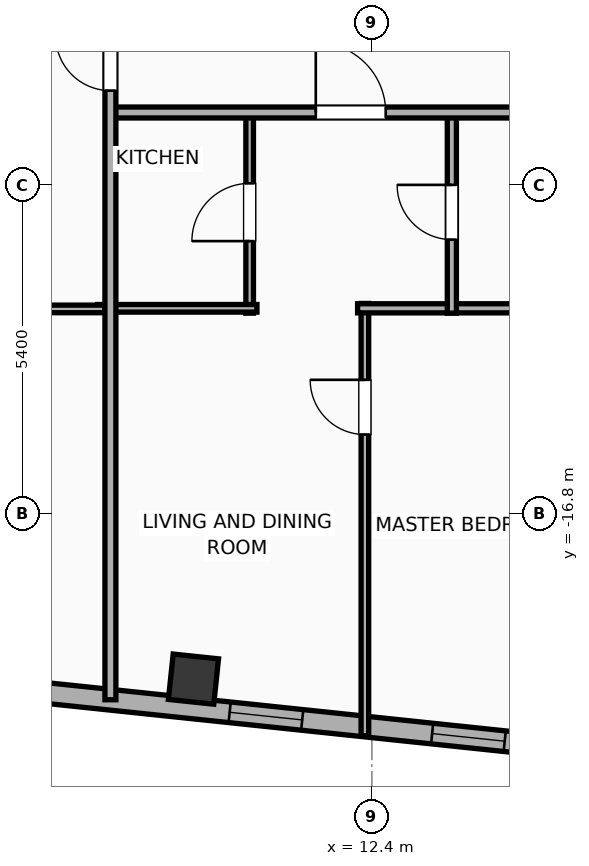
"""IFC4 building model, lengths in metres.
Left out: names, types, materials, properties, quantities, classifications, styles, units other than length and angle.
Written with IfcOpenShell. Run it as: python <this file> out.ifc"""

import sys

from ifc_helpers import new_model, si_unit, direction, frame, frame_2d, origin, origin_2d, place, context, subcontext, project, spatial, rectangle, hollow_rectangle, extrude, element, fill, save


model = new_model("IFC4")
c1 = context("Model", 3, precision=1e-05, world=origin(), true_north=direction((0.0, 1.0)))
c2 = subcontext(c1, "Body", "Model", "MODEL_VIEW")
j1 = project(units=[si_unit("LENGTHUNIT", "METRE"), si_unit("PLANEANGLEUNIT", "RADIAN")], contexts=[c1])
p1 = place(None, origin())
s1 = spatial("IfcSite", under=j1, at=p1, CompositionType="ELEMENT")
p2 = place(p1, origin())
s2 = spatial("IfcBuilding", under=s1, at=p2, CompositionType="ELEMENT")
p3 = place(p2, frame((0.0, 0.0, 295.1)))
s3 = spatial("IfcBuildingStorey", under=s2, at=p3, CompositionType="ELEMENT", Elevation=295.1)
p4 = place(p3, frame((9.466, -19.518, 0.0), z_axis=(0.0, 0.0, 1.0), x_axis=(0.994521895368, -0.104528463268, 0.0)))
e1 = element("IfcColumn", 1, at=p4, inside=s3, PredefinedType="COLUMN", context=c2, shape_type="SweptSolid", body=[
    extrude(hollow_rectangle(XDim=0.75, YDim=0.75, WallThickness=0.025, at=origin_2d()), origin(), (0.0, 0.0, 1.0), 3.9),
])
p5 = place(p3, frame((18.708, -20.972, 0.0), z_axis=(0.0, 0.0, 1.0), x_axis=(-0.994521888554, 0.104528528102, 0.0)))
e2 = element("IfcWall", 2, at=p5, inside=s3, PredefinedType="ELEMENTEDWALL", context=c2, shape_type="SweptSolid", body=[
    extrude(rectangle(XDim=46.766, YDim=0.34, at=frame_2d((23.383, 0.0))), origin(), (0.0, 0.0, 1.0), 3.635),
])
p6 = place(p5, frame((23.733, 0.0, 0.65)))
e3 = element("IfcOpeningElement", 3, at=p6, cuts=e2, PredefinedType="OPENING", context=c2, shape_type="SweptSolid", body=[
    extrude(rectangle(XDim=2.6, YDim=2.45, at=frame_2d((1.3, 1.225))), frame((0.0, 0.18, 0.0), z_axis=(0.0, -1.0, 0.0), x_axis=(1.0, 0.0, 0.0)), (0.0, 0.0, 1.0), 0.36),
])
p7 = place(p5, frame((44.402, 0.0, 0.75)))
e4 = element("IfcOpeningElement", 4, at=p7, cuts=e2, PredefinedType="OPENING", context=c2, shape_type="SweptSolid", body=[
    extrude(rectangle(XDim=1.2, YDim=2.05, at=frame_2d((0.6, 1.025))), frame((0.0, 0.18, 0.0), z_axis=(0.0, -1.0, 0.0), x_axis=(1.0, 0.0, 0.0)), (0.0, 0.0, 1.0), 0.36),
])
p8 = place(p5, frame((39.553, 0.0, 0.75)))
e5 = element("IfcOpeningElement", 5, at=p8, cuts=e2, PredefinedType="OPENING", context=c2, shape_type="SweptSolid", body=[
    extrude(rectangle(XDim=1.2, YDim=2.05, at=frame_2d((0.6, 1.025))), frame((0.0, 0.18, 0.0), z_axis=(0.0, -1.0, 0.0), x_axis=(1.0, 0.0, 0.0)), (0.0, 0.0, 1.0), 0.36),
])
p9 = place(p5, frame((42.419, 0.0, 0.75)))
e6 = element("IfcOpeningElement", 6, at=p9, cuts=e2, PredefinedType="OPENING", context=c2, shape_type="SweptSolid", body=[
    extrude(rectangle(XDim=1.2, YDim=2.05, at=frame_2d((0.6, 1.025))), frame((0.0, 0.18, 0.0), z_axis=(0.0, -1.0, 0.0), x_axis=(1.0, 0.0, 0.0)), (0.0, 0.0, 1.0), 0.36),
])
p10 = place(p5, frame((34.933, 0.0, 0.75)))
e7 = element("IfcOpeningElement", 7, at=p10, cuts=e2, PredefinedType="OPENING", context=c2, shape_type="SweptSolid", body=[
    extrude(rectangle(XDim=1.2, YDim=2.05, at=frame_2d((0.6, 1.025))), frame((0.0, 0.18, 0.0), z_axis=(0.0, -1.0, 0.0), x_axis=(1.0, 0.0, 0.0)), (0.0, 0.0, 1.0), 0.36),
])
p11 = place(p5, frame((28.692, 0.0, 0.75)))
e8 = element("IfcOpeningElement", 8, at=p11, cuts=e2, PredefinedType="OPENING", context=c2, shape_type="SweptSolid", body=[
    extrude(rectangle(XDim=1.2, YDim=2.05, at=frame_2d((0.6, 1.025))), frame((0.0, 0.18, 0.0), z_axis=(0.0, -1.0, 0.0), x_axis=(1.0, 0.0, 0.0)), (0.0, 0.0, 1.0), 0.36),
])
p12 = place(p5, frame((30.957, 0.0, 0.75)))
e9 = element("IfcOpeningElement", 9, at=p12, cuts=e2, PredefinedType="OPENING", context=c2, shape_type="SweptSolid", body=[
    extrude(rectangle(XDim=1.2, YDim=2.05, at=frame_2d((0.6, 1.025))), frame((0.0, 0.18, 0.0), z_axis=(0.0, -1.0, 0.0), x_axis=(1.0, 0.0, 0.0)), (0.0, 0.0, 1.0), 0.36),
])
p13 = place(p5, frame((7.495, 0.0, 0.75)))
e10 = element("IfcOpeningElement", 10, at=p13, cuts=e2, PredefinedType="OPENING", context=c2, shape_type="SweptSolid", body=[
    extrude(rectangle(XDim=1.2, YDim=2.05, at=frame_2d((0.6, 1.025))), frame((0.0, 0.18, 0.0), z_axis=(0.0, -1.0, 0.0), x_axis=(1.0, 0.0, 0.0)), (0.0, 0.0, 1.0), 0.36),
])
p14 = place(p5, frame((4.146, 0.0, 0.75)))
e11 = element("IfcOpeningElement", 11, at=p14, cuts=e2, PredefinedType="OPENING", context=c2, shape_type="SweptSolid", body=[
    extrude(rectangle(XDim=1.2, YDim=2.05, at=frame_2d((0.6, 1.025))), frame((0.0, 0.18, 0.0), z_axis=(0.0, -1.0, 0.0), x_axis=(1.0, 0.0, 0.0)), (0.0, 0.0, 1.0), 0.36),
])
p15 = place(p5, frame((1.362, 0.0, 0.75)))
e12 = element("IfcOpeningElement", 12, at=p15, cuts=e2, PredefinedType="OPENING", context=c2, shape_type="SweptSolid", body=[
    extrude(rectangle(XDim=1.2, YDim=2.05, at=frame_2d((0.6, 1.025))), frame((0.0, 0.18, 0.0), z_axis=(0.0, -1.0, 0.0), x_axis=(1.0, 0.0, 0.0)), (0.0, 0.0, 1.0), 0.36),
])
p16 = place(p5, frame((20.254, 0.0, 0.75)))
e13 = element("IfcOpeningElement", 13, at=p16, cuts=e2, PredefinedType="OPENING", context=c2, shape_type="SweptSolid", body=[
    extrude(rectangle(XDim=1.2, YDim=2.05, at=frame_2d((0.6, 1.025))), frame((0.0, 0.18, 0.0), z_axis=(0.0, -1.0, 0.0), x_axis=(1.0, 0.0, 0.0)), (0.0, 0.0, 1.0), 0.36),
])
p17 = place(p5, frame((16.172, 0.0, 0.75)))
e14 = element("IfcOpeningElement", 14, at=p17, cuts=e2, PredefinedType="OPENING", context=c2, shape_type="SweptSolid", body=[
    extrude(rectangle(XDim=1.2, YDim=2.05, at=frame_2d((0.6, 1.025))), frame((0.0, 0.18, 0.0), z_axis=(0.0, -1.0, 0.0), x_axis=(1.0, 0.0, 0.0)), (0.0, 0.0, 1.0), 0.36),
])
p18 = place(p5, frame((12.11, 0.0, 0.75)))
e15 = element("IfcOpeningElement", 15, at=p18, cuts=e2, PredefinedType="OPENING", context=c2, shape_type="SweptSolid", body=[
    extrude(rectangle(XDim=1.2, YDim=2.05, at=frame_2d((0.6, 1.025))), frame((0.0, 0.18, 0.0), z_axis=(0.0, -1.0, 0.0), x_axis=(1.0, 0.0, 0.0)), (0.0, 0.0, 1.0), 0.36),
])
p19 = place(p3, frame((12.285, -20.448, 0.0), z_axis=(0.0, 0.0, 1.0), x_axis=(0.0, 1.0, 0.0)))
e16 = element("IfcWall", 16, at=p19, inside=s3, PredefinedType="PARTITIONING", context=c2, shape_type="SweptSolid", body=[
    extrude(rectangle(XDim=7.108, YDim=0.125, at=frame_2d((3.554, 0.0))), origin(), (0.0, 0.0, 1.0), 3.635),
])
p20 = place(p19, frame((4.952, 0.0, 0.0)))
e17 = element("IfcOpeningElement", 17, at=p20, cuts=e16, PredefinedType="OPENING", context=c2, shape_type="SweptSolid", body=[
    extrude(rectangle(XDim=0.9, YDim=2.05, at=frame_2d((0.45, 1.025))), frame((0.0, 0.073, 0.0), z_axis=(0.0, -1.0, 0.0), x_axis=(1.0, 0.0, 0.0)), (0.0, 0.0, 1.0), 0.145),
])
p21 = place(p3, frame((12.165, -13.42, 0.0), z_axis=(0.0, 0.0, 1.0), x_axis=(1.0, 0.0, 0.0)))
e18 = element("IfcWall", 18, at=p21, inside=s3, PredefinedType="PLUMBINGWALL", context=c2, shape_type="SweptSolid", body=[
    extrude(rectangle(XDim=3.605, YDim=0.15, at=frame_2d((1.802, 0.0))), origin(), (0.0, 0.0, 1.0), 3.635),
])
p22 = place(p3, frame((10.39, -13.5, 0.0), z_axis=(0.0, 0.0, 1.0), x_axis=(0.0, 1.0, 0.0)))
e19 = element("IfcWall", 19, at=p22, inside=s3, PredefinedType="PARTITIONING", context=c2, shape_type="SweptSolid", body=[
    extrude(rectangle(XDim=3.32, YDim=0.125, at=frame_2d((1.66, 0.0))), origin(), (0.0, 0.0, 1.0), 3.635),
])
p23 = place(p22, frame((1.185, 0.0, 0.0)))
e20 = element("IfcOpeningElement", 20, at=p23, cuts=e19, PredefinedType="OPENING", context=c2, shape_type="SweptSolid", body=[
    extrude(rectangle(XDim=0.95, YDim=2.05, at=frame_2d((0.475, 1.025))), frame((0.0, 0.073, 0.0), z_axis=(0.0, -1.0, 0.0), x_axis=(1.0, 0.0, 0.0)), (0.0, 0.0, 1.0), 0.145),
])
p24 = place(p3, frame((7.887, -13.42, 0.0), z_axis=(0.0, 0.0, 1.0), x_axis=(1.0, 0.0, 0.0)))
e21 = element("IfcWall", 21, at=p24, inside=s3, PredefinedType="PARTITIONING", context=c2, shape_type="SweptSolid", body=[
    extrude(rectangle(XDim=2.623, YDim=0.125, at=frame_2d((1.311, 0.0))), origin(), (0.0, 0.0, 1.0), 3.635),
])
p25 = place(p3, frame((13.715, -13.5, 0.0), z_axis=(0.0, 0.0, 1.0), x_axis=(0.0, 1.0, 0.0)))
e22 = element("IfcWall", 22, at=p25, inside=s3, PredefinedType="PLUMBINGWALL", context=c2, shape_type="SweptSolid", body=[
    extrude(rectangle(XDim=3.32, YDim=0.15, at=frame_2d((1.66, 0.0))), origin(), (0.0, 0.0, 1.0), 3.635),
])
p26 = place(p25, frame((1.21, 0.0, 0.0)))
e23 = element("IfcOpeningElement", 23, at=p26, cuts=e22, PredefinedType="OPENING", context=c2, shape_type="SweptSolid", body=[
    extrude(rectangle(XDim=0.9, YDim=2.05, at=frame_2d((0.45, 1.025))), frame((0.0, 0.085, 0.0), z_axis=(0.0, -1.0, 0.0), x_axis=(1.0, 0.0, 0.0)), (0.0, 0.0, 1.0), 0.17),
])
p27 = place(p3, frame((8.08, -10.2, 0.0), z_axis=(0.0, 0.0, 1.0), x_axis=(1.0, 0.0, 0.0)))
e24 = element("IfcWall", 24, at=p27, inside=s3, PredefinedType="PARTITIONING", context=c2, shape_type="SweptSolid", body=[
    extrude(rectangle(XDim=15.226, YDim=0.18, at=frame_2d((7.613, 0.0))), origin(), (0.0, 0.0, 1.0), 3.635),
])
p28 = place(p27, frame((3.397, 0.0, 0.0)))
e25 = element("IfcOpeningElement", 25, at=p28, cuts=e24, PredefinedType="OPENING", context=c2, shape_type="SweptSolid", body=[
    extrude(rectangle(XDim=1.15, YDim=2.05, at=frame_2d((0.575, 1.025))), frame((0.0, 0.1, 0.0), z_axis=(0.0, -1.0, 0.0), x_axis=(1.0, 0.0, 0.0)), (0.0, 0.0, 1.0), 0.2),
])
p29 = place(p27, frame((11.042, 0.0, 0.0)))
e26 = element("IfcOpeningElement", 26, at=p29, cuts=e24, PredefinedType="OPENING", context=c2, shape_type="SweptSolid", body=[
    extrude(rectangle(XDim=1.15, YDim=2.05, at=frame_2d((0.575, 1.025))), frame((0.0, 0.1, 0.0), z_axis=(0.0, -1.0, 0.0), x_axis=(1.0, 0.0, 0.0)), (0.0, 0.0, 1.0), 0.2),
])
p30 = place(p3, frame((0.02, -13.43, 0.0), z_axis=(0.0, 0.0, 1.0), x_axis=(1.0, 0.0, 0.0)))
e27 = element("IfcWall", 27, at=p30, inside=s3, PredefinedType="PARTITIONING", context=c2, shape_type="SweptSolid", body=[
    extrude(rectangle(XDim=7.992, YDim=0.125, at=frame_2d((3.996, 0.0))), origin(), (0.0, 0.0, 1.0), 3.635),
])
p31 = place(p30, frame((1.323, 0.0, 0.0)))
e28 = element("IfcOpeningElement", 28, at=p31, cuts=e27, PredefinedType="OPENING", context=c2, shape_type="SweptSolid", body=[
    extrude(rectangle(XDim=0.9, YDim=2.05, at=frame_2d((0.45, 1.025))), frame((0.0, 0.073, 0.0), z_axis=(0.0, -1.0, 0.0), x_axis=(1.0, 0.0, 0.0)), (0.0, 0.0, 1.0), 0.145),
])
p32 = place(p30, frame((5.837, 0.0, 0.0)))
e29 = element("IfcOpeningElement", 29, at=p32, cuts=e27, PredefinedType="OPENING", context=c2, shape_type="SweptSolid", body=[
    extrude(rectangle(XDim=0.9, YDim=2.05, at=frame_2d((0.45, 1.025))), frame((0.0, 0.073, 0.0), z_axis=(0.0, -1.0, 0.0), x_axis=(1.0, 0.0, 0.0)), (0.0, 0.0, 1.0), 0.145),
])
p33 = place(p3, frame((8.1, -19.857, 0.0), z_axis=(0.0, 0.0, 1.0), x_axis=(0.0, 1.0, 0.0)))
e30 = element("IfcWall", 30, at=p33, inside=s3, PredefinedType="PARTITIONING", context=c2, shape_type="SweptSolid", body=[
    extrude(rectangle(XDim=11.267, YDim=0.18, at=frame_2d((5.634, 0.0))), origin(), (0.0, 0.0, 1.0), 3.635),
])
p34 = place(p33, frame((10.017, 0.0, 0.0)))
e31 = element("IfcOpeningElement", 31, at=p34, cuts=e30, PredefinedType="OPENING", context=c2, shape_type="SweptSolid", body=[
    extrude(rectangle(XDim=0.9, YDim=2.05, at=frame_2d((0.45, 1.025))), frame((0.0, 0.1, 0.0), z_axis=(0.0, -1.0, 0.0), x_axis=(1.0, 0.0, 0.0)), (0.0, 0.0, 1.0), 0.2),
])
p35 = place(p13, origin())
e32 = element("IfcWindow", 32, at=p35, inside=s3, PartitioningType="SINGLE_PANEL", PredefinedType="WINDOW", context=c2, shape_type="SweptSolid", body=[
    extrude(rectangle(XDim=1.2, YDim=2.05, at=frame_2d((0.6, 1.025))), frame((0.0, 0.03, 0.0), z_axis=(0.0, -1.0, 0.0), x_axis=(1.0, 0.0, 0.0)), (0.0, 0.0, 1.0), 0.06),
])
fill(e10, e32)
p36 = place(p14, origin())
e33 = element("IfcWindow", 33, at=p36, inside=s3, PartitioningType="SINGLE_PANEL", PredefinedType="WINDOW", context=c2, shape_type="SweptSolid", body=[
    extrude(rectangle(XDim=1.2, YDim=2.05, at=frame_2d((0.6, 1.025))), frame((0.0, 0.03, 0.0), z_axis=(0.0, -1.0, 0.0), x_axis=(1.0, 0.0, 0.0)), (0.0, 0.0, 1.0), 0.06),
])
fill(e11, e33)
p37 = place(p20, origin())
e34 = element("IfcDoor", 34, at=p37, inside=s3, OperationType="SINGLE_SWING_RIGHT", PredefinedType="DOOR", context=c2, shape_type="SweptSolid", body=[
    extrude(rectangle(XDim=0.9, YDim=2.05, at=frame_2d((0.45, 1.025))), frame((0.0, 0.025, 0.0), z_axis=(0.0, -1.0, 0.0), x_axis=(1.0, 0.0, 0.0)), (0.0, 0.0, 1.0), 0.05),
])
fill(e17, e34)
p38 = place(p23, origin())
e35 = element("IfcDoor", 35, at=p38, inside=s3, OperationType="SINGLE_SWING_LEFT", PredefinedType="DOOR", context=c2, shape_type="SweptSolid", body=[
    extrude(rectangle(XDim=0.95, YDim=2.05, at=frame_2d((0.475, 1.025))), frame((0.0, 0.025, 0.0), z_axis=(0.0, -1.0, 0.0), x_axis=(1.0, 0.0, 0.0)), (0.0, 0.0, 1.0), 0.05),
])
fill(e20, e35)
p39 = place(p26, origin())
e36 = element("IfcDoor", 36, at=p39, inside=s3, OperationType="SINGLE_SWING_RIGHT", PredefinedType="DOOR", context=c2, shape_type="SweptSolid", body=[
    extrude(rectangle(XDim=0.9, YDim=2.05, at=frame_2d((0.45, 1.025))), frame((0.0, 0.025, 0.0), z_axis=(0.0, -1.0, 0.0), x_axis=(1.0, 0.0, 0.0)), (0.0, 0.0, 1.0), 0.05),
])
fill(e23, e36)
p40 = place(p28, origin())
e37 = element("IfcDoor", 37, at=p40, inside=s3, OperationType="SINGLE_SWING_LEFT", PredefinedType="DOOR", context=c2, shape_type="SweptSolid", body=[
    extrude(rectangle(XDim=1.15, YDim=2.05, at=frame_2d((0.575, 1.025))), frame((0.0, 0.025, 0.0), z_axis=(0.0, -1.0, 0.0), x_axis=(1.0, 0.0, 0.0)), (0.0, 0.0, 1.0), 0.05),
])
fill(e25, e37)
p41 = place(p34, origin())
e38 = element("IfcDoor", 38, at=p41, inside=s3, OperationType="SINGLE_SWING_RIGHT", PredefinedType="DOOR", context=c2, shape_type="SweptSolid", body=[
    extrude(rectangle(XDim=0.9, YDim=2.05, at=frame_2d((0.45, 1.025))), frame((0.0, 0.025, 0.0), z_axis=(0.0, -1.0, 0.0), x_axis=(1.0, 0.0, 0.0)), (0.0, 0.0, 1.0), 0.05),
])
fill(e31, e38)
save(model, sys.argv[1])
